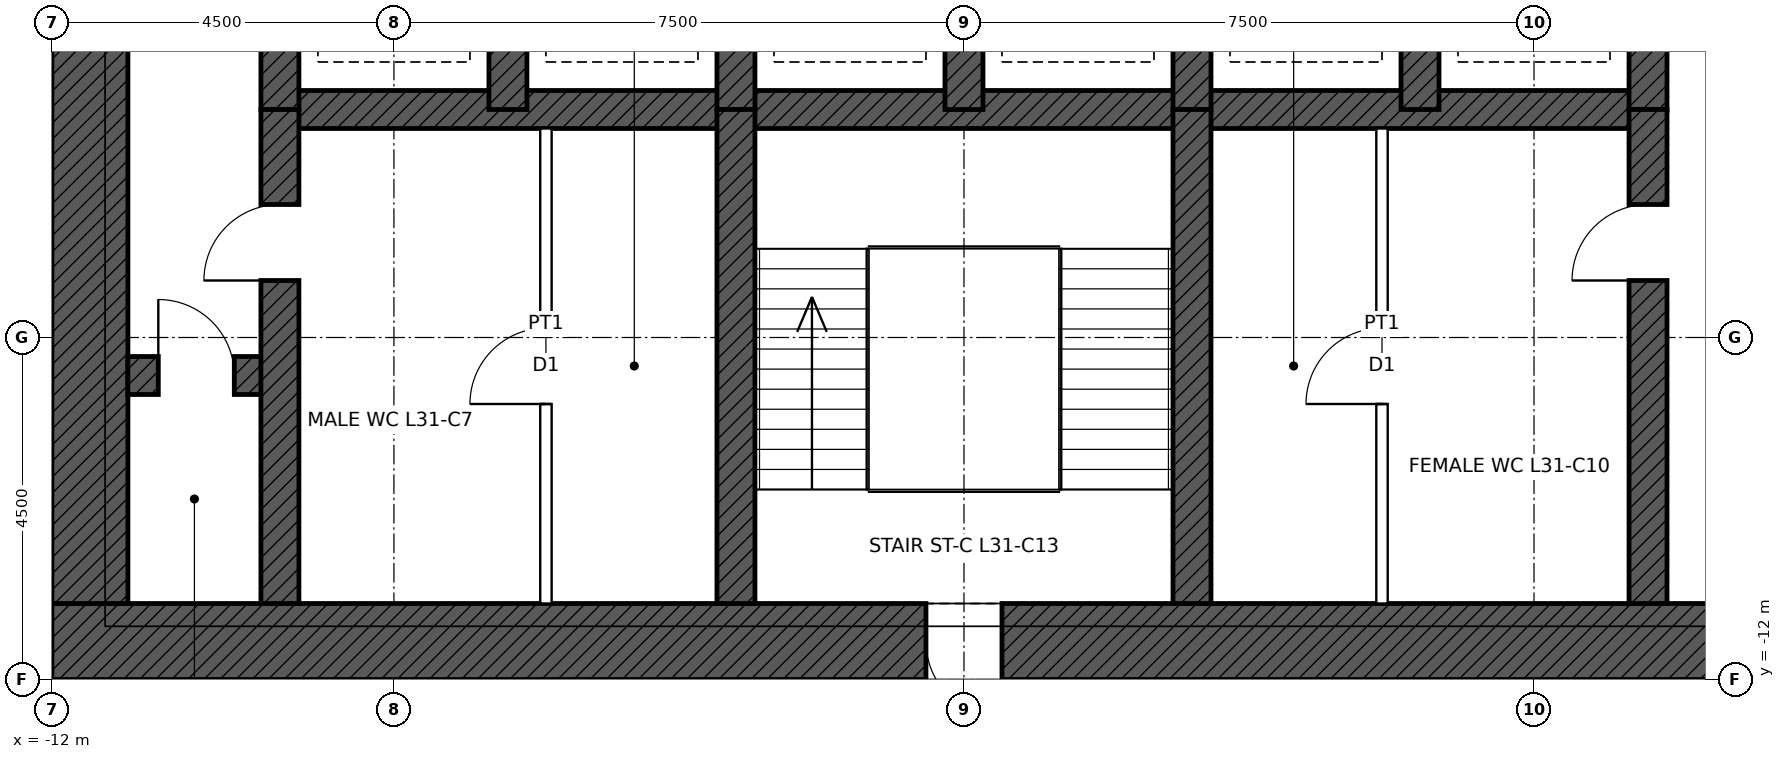
"""IFC4 building model, lengths in metres.
Left out: names, types, materials, properties, quantities, classifications, styles, units other than length and angle.
Written with IfcOpenShell. Run it as: python <this file> out.ifc"""

import sys

from ifc_helpers import new_model, si_unit, direction, frame, frame_2d, origin, place, context, subcontext, project, spatial, rectangle, extrude, element, fill, save


model = new_model("IFC4")
c1 = context("Model", 3, precision=1e-05, world=origin(), true_north=direction((0.0, 1.0)))
c2 = subcontext(c1, "Body", "Model", "MODEL_VIEW")
j1 = project(units=[si_unit("LENGTHUNIT", "METRE"), si_unit("PLANEANGLEUNIT", "RADIAN")], contexts=[c1])
p1 = place(None, origin())
s1 = spatial("IfcSite", under=j1, at=p1, CompositionType="ELEMENT")
p2 = place(p1, origin())
s2 = spatial("IfcBuilding", under=s1, at=p2, CompositionType="ELEMENT")
p3 = place(p2, frame((0.0, 0.0, 153.9)))
s3 = spatial("IfcBuildingStorey", under=s2, at=p3, CompositionType="ELEMENT", Elevation=153.9)
p4 = place(p3, frame((12.0, -11.5, 0.0), z_axis=(0.0, 0.0, 1.0), x_axis=(-1.0, 0.0, 0.0)))
e1 = element("IfcWall", 1, at=p4, inside=s3, PredefinedType="SHEAR", context=c2, shape_type="SweptSolid", body=[
    extrude(rectangle(XDim=24.0, YDim=1.0, at=frame_2d((12.0, 0.0))), origin(), (0.0, 0.0, 1.0), 4.5),
])
p5 = place(p4, frame((11.5, 0.0, 0.0)))
e2 = element("IfcOpeningElement", 2, at=p5, cuts=e1, PredefinedType="OPENING", context=c2, shape_type="SweptSolid", body=[
    extrude(rectangle(XDim=1.0, YDim=2.1, at=frame_2d((0.5, 1.05))), frame((0.0, 0.51, 0.0), z_axis=(0.0, -1.0, 0.0), x_axis=(1.0, 0.0, 0.0)), (0.0, 0.0, 1.0), 1.02),
])
p6 = place(p4, frame((1.0, 0.0, 0.0)))
e3 = element("IfcOpeningElement", 3, at=p6, cuts=e1, PredefinedType="OPENING", context=c2, shape_type="SweptSolid", body=[
    extrude(rectangle(XDim=1.0, YDim=2.4, at=frame_2d((0.5, 1.2))), frame((0.0, 0.51, 0.0), z_axis=(0.0, -1.0, 0.0), x_axis=(1.0, 0.0, 0.0)), (0.0, 0.0, 1.0), 1.02),
])
p7 = place(p3, frame((-11.5, -11.0, 0.0), z_axis=(0.0, 0.0, 1.0), x_axis=(0.0, 1.0, 0.0)))
e4 = element("IfcWall", 4, at=p7, inside=s3, PredefinedType="SHEAR", context=c2, shape_type="SweptSolid", body=[
    extrude(rectangle(XDim=22.0, YDim=1.0, at=frame_2d((11.0, 0.0))), origin(), (0.0, 0.0, 1.0), 4.5),
])
p8 = place(p7, frame((10.5, 0.0, 0.0)))
e5 = element("IfcOpeningElement", 5, at=p8, cuts=e4, PredefinedType="OPENING", context=c2, shape_type="SweptSolid", body=[
    extrude(rectangle(XDim=1.0, YDim=2.4, at=frame_2d((0.5, 1.2))), frame((0.0, 0.51, 0.0), z_axis=(0.0, -1.0, 0.0), x_axis=(1.0, 0.0, 0.0)), (0.0, 0.0, 1.0), 1.02),
])
p9 = place(p3, frame((-9.0, -4.5, 0.0), z_axis=(0.0, 0.0, 1.0), x_axis=(1.0, 0.0, 0.0)))
e6 = element("IfcWall", 6, at=p9, inside=s3, PredefinedType="SHEAR", context=c2, shape_type="SweptSolid", body=[
    extrude(rectangle(XDim=18.0, YDim=0.5, at=frame_2d((9.0, 0.0))), origin(), (0.0, 0.0, 1.0), 4.5),
])
p10 = place(p3, frame((-11.0, -8.0, 0.0), z_axis=(0.0, 0.0, 1.0), x_axis=(1.0, 0.0, 0.0)))
e7 = element("IfcWall", 7, at=p10, inside=s3, PredefinedType="SHEAR", context=c2, shape_type="SweptSolid", body=[
    extrude(rectangle(XDim=2.0, YDim=0.5, at=frame_2d((1.0, 0.0))), origin(), (0.0, 0.0, 1.0), 4.5),
])
p11 = place(p10, frame((0.4, 0.0, 0.0)))
e8 = element("IfcOpeningElement", 8, at=p11, cuts=e7, PredefinedType="OPENING", context=c2, shape_type="SweptSolid", body=[
    extrude(rectangle(XDim=1.0, YDim=2.1, at=frame_2d((0.5, 1.05))), frame((0.0, 0.26, 0.0), z_axis=(0.0, -1.0, 0.0), x_axis=(1.0, 0.0, 0.0)), (0.0, 0.0, 1.0), 0.52),
])
for number, where, z_axis, x_axis in (
    (9, (-9.0, -4.5, 0.0), (0.0, 0.0, 1.0), (0.0, 1.0, 0.0)),
    (10, (9.0, -4.5, 0.0), (0.0, 0.0, 1.0), (0.0, 1.0, 0.0)),
    (11, (-6.0, -4.5, 0.0), (0.0, 0.0, 1.0), (0.0, 1.0, 0.0)),
    (12, (-3.0, -4.5, 0.0), (0.0, 0.0, 1.0), (0.0, 1.0, 0.0)),
    (13, (0.0, -4.5, 0.0), (0.0, 0.0, 1.0), (0.0, 1.0, 0.0)),
    (14, (3.0, -4.5, 0.0), (0.0, 0.0, 1.0), (0.0, 1.0, 0.0)),
    (15, (6.0, -4.5, 0.0), (0.0, 0.0, 1.0), (0.0, 1.0, 0.0)),
):
    element("IfcWall", number, at=place(p3, frame(where, z_axis=z_axis, x_axis=x_axis)), inside=s3, PredefinedType="SHEAR", context=c2, shape_type="SweptSolid", body=[
        extrude(rectangle(XDim=3.0, YDim=0.5, at=frame_2d((1.5, 0.0))), origin(), (0.0, 0.0, 1.0), 4.5),
    ])
p12 = place(p3, frame((-9.0, -11.0, 0.0), z_axis=(0.0, 0.0, 1.0), x_axis=(0.0, 1.0, 0.0)))
e16 = element("IfcWall", 16, at=p12, inside=s3, PredefinedType="SHEAR", context=c2, shape_type="SweptSolid", body=[
    extrude(rectangle(XDim=6.5, YDim=0.5, at=frame_2d((3.25, 0.0))), origin(), (0.0, 0.0, 1.0), 4.5),
])
p13 = place(p12, frame((4.25, 0.0, 0.0)))
e17 = element("IfcOpeningElement", 17, at=p13, cuts=e16, PredefinedType="OPENING", context=c2, shape_type="SweptSolid", body=[
    extrude(rectangle(XDim=1.0, YDim=2.1, at=frame_2d((0.5, 1.05))), frame((0.0, 0.26, 0.0), z_axis=(0.0, -1.0, 0.0), x_axis=(1.0, 0.0, 0.0)), (0.0, 0.0, 1.0), 0.52),
])
p14 = place(p3, frame((9.0, -11.0, 0.0), z_axis=(0.0, 0.0, 1.0), x_axis=(0.0, 1.0, 0.0)))
e18 = element("IfcWall", 18, at=p14, inside=s3, PredefinedType="SHEAR", context=c2, shape_type="SweptSolid", body=[
    extrude(rectangle(XDim=6.5, YDim=0.5, at=frame_2d((3.25, 0.0))), origin(), (0.0, 0.0, 1.0), 4.5),
])
p15 = place(p14, frame((4.25, 0.0, 0.0)))
e19 = element("IfcOpeningElement", 19, at=p15, cuts=e18, PredefinedType="OPENING", context=c2, shape_type="SweptSolid", body=[
    extrude(rectangle(XDim=1.0, YDim=2.1, at=frame_2d((0.5, 1.05))), frame((0.0, 0.26, 0.0), z_axis=(0.0, -1.0, 0.0), x_axis=(1.0, 0.0, 0.0)), (0.0, 0.0, 1.0), 0.52),
])
for number, where, z_axis, x_axis in (
    (20, (-3.0, -11.0, 0.0), (0.0, 0.0, 1.0), (0.0, 1.0, 0.0)),
    (21, (3.0, -11.0, 0.0), (0.0, 0.0, 1.0), (0.0, 1.0, 0.0)),
):
    element("IfcWall", number, at=place(p3, frame(where, z_axis=z_axis, x_axis=x_axis)), inside=s3, PredefinedType="SHEAR", context=c2, shape_type="SweptSolid", body=[
        extrude(rectangle(XDim=6.5, YDim=0.5, at=frame_2d((3.25, 0.0))), origin(), (0.0, 0.0, 1.0), 4.5),
    ])
p16 = place(p3, frame((-5.5, -11.0, 0.0), z_axis=(0.0, 0.0, 1.0), x_axis=(0.0, 1.0, 0.0)))
e22 = element("IfcWall", 22, at=p16, inside=s3, PredefinedType="PARTITIONING", context=c2, shape_type="SweptSolid", body=[
    extrude(rectangle(XDim=6.25, YDim=0.15, at=frame_2d((3.125, 0.0))), origin(), (0.0, 0.0, 1.0), 4.25),
])
p17 = place(p16, frame((2.625, 0.0, 0.0)))
e23 = element("IfcOpeningElement", 23, at=p17, cuts=e22, PredefinedType="OPENING", context=c2, shape_type="SweptSolid", body=[
    extrude(rectangle(XDim=1.0, YDim=2.1, at=frame_2d((0.5, 1.05))), frame((0.0, 0.085, 0.0), z_axis=(0.0, -1.0, 0.0), x_axis=(1.0, 0.0, 0.0)), (0.0, 0.0, 1.0), 0.17),
])
p18 = place(p3, frame((5.5, -11.0, 0.0), z_axis=(0.0, 0.0, 1.0), x_axis=(0.0, 1.0, 0.0)))
e24 = element("IfcWall", 24, at=p18, inside=s3, PredefinedType="PARTITIONING", context=c2, shape_type="SweptSolid", body=[
    extrude(rectangle(XDim=6.25, YDim=0.15, at=frame_2d((3.125, 0.0))), origin(), (0.0, 0.0, 1.0), 4.25),
])
p19 = place(p18, frame((2.625, 0.0, 0.0)))
e25 = element("IfcOpeningElement", 25, at=p19, cuts=e24, PredefinedType="OPENING", context=c2, shape_type="SweptSolid", body=[
    extrude(rectangle(XDim=1.0, YDim=2.1, at=frame_2d((0.5, 1.05))), frame((0.0, 0.085, 0.0), z_axis=(0.0, -1.0, 0.0), x_axis=(1.0, 0.0, 0.0)), (0.0, 0.0, 1.0), 0.17),
])
p20 = place(p5, origin())
e26 = element("IfcDoor", 26, at=p20, inside=s3, OperationType="SINGLE_SWING_LEFT", PredefinedType="DOOR", context=c2, shape_type="SweptSolid", body=[
    extrude(rectangle(XDim=1.0, YDim=2.1, at=frame_2d((0.5, 1.05))), frame((0.0, 0.485, 0.0), z_axis=(0.0, -1.0, 0.0), x_axis=(1.0, 0.0, 0.0)), (0.0, 0.0, 1.0), 0.05),
])
fill(e2, e26)
p21 = place(p13, origin())
e27 = element("IfcDoor", 27, at=p21, inside=s3, OperationType="SINGLE_SWING_LEFT", PredefinedType="DOOR", context=c2, shape_type="SweptSolid", body=[
    extrude(rectangle(XDim=1.0, YDim=2.1, at=frame_2d((0.5, 1.05))), frame((0.0, 0.025, 0.0), z_axis=(0.0, -1.0, 0.0), x_axis=(1.0, 0.0, 0.0)), (0.0, 0.0, 1.0), 0.05),
])
fill(e17, e27)
p22 = place(p15, origin())
e28 = element("IfcDoor", 28, at=p22, inside=s3, OperationType="SINGLE_SWING_LEFT", PredefinedType="DOOR", context=c2, shape_type="SweptSolid", body=[
    extrude(rectangle(XDim=1.0, YDim=2.1, at=frame_2d((0.5, 1.05))), frame((0.0, 0.025, 0.0), z_axis=(0.0, -1.0, 0.0), x_axis=(1.0, 0.0, 0.0)), (0.0, 0.0, 1.0), 0.05),
])
fill(e19, e28)
p23 = place(p11, origin())
e29 = element("IfcDoor", 29, at=p23, inside=s3, OperationType="SINGLE_SWING_LEFT", PredefinedType="DOOR", context=c2, shape_type="SweptSolid", body=[
    extrude(rectangle(XDim=1.0, YDim=2.1, at=frame_2d((0.5, 1.05))), frame((0.0, 0.025, 0.0), z_axis=(0.0, -1.0, 0.0), x_axis=(1.0, 0.0, 0.0)), (0.0, 0.0, 1.0), 0.05),
])
fill(e8, e29)
p24 = place(p17, origin())
e30 = element("IfcDoor", 30, at=p24, inside=s3, OperationType="SINGLE_SWING_LEFT", PredefinedType="DOOR", context=c2, shape_type="SweptSolid", body=[
    extrude(rectangle(XDim=1.0, YDim=2.1, at=frame_2d((0.5, 1.05))), frame((0.0, 0.025, 0.0), z_axis=(0.0, -1.0, 0.0), x_axis=(1.0, 0.0, 0.0)), (0.0, 0.0, 1.0), 0.05),
])
fill(e23, e30)
p25 = place(p19, origin())
e31 = element("IfcDoor", 31, at=p25, inside=s3, OperationType="SINGLE_SWING_LEFT", PredefinedType="DOOR", context=c2, shape_type="SweptSolid", body=[
    extrude(rectangle(XDim=1.0, YDim=2.1, at=frame_2d((0.5, 1.05))), frame((0.0, 0.025, 0.0), z_axis=(0.0, -1.0, 0.0), x_axis=(1.0, 0.0, 0.0)), (0.0, 0.0, 1.0), 0.05),
])
fill(e25, e31)
save(model, sys.argv[1])
